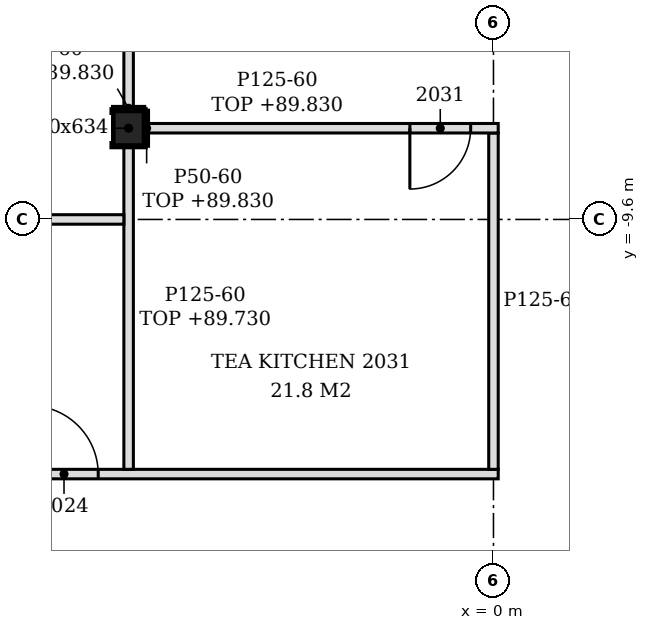
"""IFC4 building model, lengths in metres.
Left out: names, types, materials, properties, quantities, classifications, styles, units other than length and angle.
Written with IfcOpenShell. Run it as: python <this file> out.ifc"""

import sys

from ifc_helpers import new_model, si_unit, direction, frame, frame_2d, origin, origin_2d, place, context, subcontext, project, spatial, polyline, rectangle, i_section, outline, extrude, element, fill, save


model = new_model("IFC4")
c1 = context("Model", 3, precision=1e-05, world=origin(), true_north=direction((0.0, 1.0)))
c2 = subcontext(c1, "Body", "Model", "MODEL_VIEW")
j1 = project(units=[si_unit("LENGTHUNIT", "METRE"), si_unit("PLANEANGLEUNIT", "RADIAN")], contexts=[c1])
p1 = place(None, origin())
s1 = spatial("IfcSite", under=j1, at=p1, CompositionType="ELEMENT")
p2 = place(p1, origin())
s2 = spatial("IfcBuilding", under=s1, at=p2, CompositionType="ELEMENT")
p3 = place(p2, frame((0.0, 0.0, 87.0)))
s3 = spatial("IfcBuildingStorey", under=s2, at=p3, CompositionType="ELEMENT", Elevation=87.0)
p4 = place(p3, frame((-4.8, -8.4, -0.15), z_axis=(0.0, 0.0, 1.0), x_axis=(1.0, 0.0, 0.0)))
e1 = element("IfcColumn", 1, at=p4, inside=s3, PredefinedType="COLUMN", context=c2, shape_type="SweptSolid", body=[
    extrude(i_section(OverallWidth=0.424, OverallDepth=0.474, WebThickness=0.048, FlangeThickness=0.077, FilletRadius=0.015, at=origin_2d()), origin(), (0.0, 0.0, 1.0), 3.6),
])
p5 = place(p3, frame((-20.413, -12.95, 0.0), z_axis=(0.0, 0.0, 1.0), x_axis=(1.0, 0.0, 0.0)))
e2 = element("IfcWall", 2, at=p5, inside=s3, PredefinedType="PARTITIONING", context=c2, shape_type="SweptSolid", body=[
    extrude(outline(polyline([(0.0, 0.0), (20.475, 0.0), (20.475, 3.45), (15.762, 3.45), (15.76, 2.73), (15.462, 2.73), (15.46, 3.45), (6.163, 3.45), (6.16, 2.93), (5.863, 2.93), (5.861, 3.45), (0.0, 3.45), (0.0, 0.0)])), frame((0.0, 0.062, 0.0), z_axis=(0.0, -1.0, 0.0), x_axis=(1.0, 0.0, 0.0)), (0.0, 0.0, 1.0), 0.125),
])
p6 = place(p5, frame((14.312, 0.0, 0.0)))
e3 = element("IfcOpeningElement", 3, at=p6, cuts=e2, PredefinedType="OPENING", context=c2, shape_type="SweptSolid", body=[
    extrude(rectangle(XDim=0.9, YDim=2.1, at=frame_2d((0.45, 1.05))), frame((0.0, 0.073, 0.0), z_axis=(0.0, -1.0, 0.0), x_axis=(1.0, 0.0, 0.0)), (0.0, 0.0, 1.0), 0.145),
])
p7 = place(p3, frame((-4.8, -12.887, 0.0), z_axis=(0.0, 0.0, 1.0), x_axis=(0.0, 1.0, 0.0)))
e4 = element("IfcWall", 4, at=p7, inside=s3, PredefinedType="PARTITIONING", context=c2, shape_type="SweptSolid", body=[
    extrude(rectangle(XDim=4.25, YDim=0.125, at=frame_2d((2.125, 0.0))), origin(), (0.0, 0.0, 1.0), 2.73),
])
p8 = place(p3, frame((0.0, -12.887, 0.0), z_axis=(0.0, 0.0, 1.0), x_axis=(0.0, 1.0, 0.0)))
e5 = element("IfcWall", 5, at=p8, inside=s3, PredefinedType="PARTITIONING", context=c2, shape_type="SweptSolid", body=[
    extrude(outline(polyline([(0.0, 0.0), (4.425, 0.0), (4.425, 2.83), (4.337, 2.83), (4.335, 3.45), (0.0, 3.45), (0.0, 0.0)])), frame((0.0, 0.062, 0.0), z_axis=(0.0, -1.0, 0.0), x_axis=(1.0, 0.0, 0.0)), (0.0, 0.0, 1.0), 0.125),
])
p9 = place(p3, frame((-14.196, -9.6, 0.0), z_axis=(0.0, 0.0, 1.0), x_axis=(1.0, 0.0, 0.0)))
e6 = element("IfcWall", 6, at=p9, inside=s3, PredefinedType="PARTITIONING", context=c2, shape_type="SweptSolid", body=[
    extrude(outline(polyline([(0.0, 0.0), (9.333, 0.0), (9.333, 2.73), (9.246, 2.73), (9.243, 3.45), (0.0, 3.45), (0.0, 0.0)])), frame((0.0, 0.062, 0.0), z_axis=(0.0, -1.0, 0.0), x_axis=(1.0, 0.0, 0.0)), (0.0, 0.0, 1.0), 0.125),
])
p10 = place(p3, frame((-4.588, -8.4, 0.0), z_axis=(0.0, 0.0, 1.0), x_axis=(1.0, 0.0, 0.0)))
e7 = element("IfcWall", 7, at=p10, inside=s3, PredefinedType="PARTITIONING", context=c2, shape_type="SweptSolid", body=[
    extrude(rectangle(XDim=4.65, YDim=0.125, at=frame_2d((2.325, 0.0))), origin(), (0.0, 0.0, 1.0), 2.83),
])
p11 = place(p10, frame((3.488, 0.0, 0.0)))
e8 = element("IfcOpeningElement", 8, at=p11, cuts=e7, PredefinedType="OPENING", context=c2, shape_type="SweptSolid", body=[
    extrude(rectangle(XDim=0.8, YDim=2.1, at=frame_2d((0.4, 1.05))), frame((0.0, 0.073, 0.0), z_axis=(0.0, -1.0, 0.0), x_axis=(1.0, 0.0, 0.0)), (0.0, 0.0, 1.0), 0.145),
])
p12 = place(p3, frame((-4.8, -8.163, 0.0), z_axis=(0.0, 0.0, 1.0), x_axis=(0.0, 1.0, 0.0)))
e9 = element("IfcWall", 9, at=p12, inside=s3, PredefinedType="PARTITIONING", context=c2, shape_type="SweptSolid", body=[
    extrude(rectangle(XDim=8.101, YDim=0.125, at=frame_2d((4.05, 0.0))), origin(), (0.0, 0.0, 1.0), 2.83),
])
p13 = place(p12, frame((2.163, 0.0, 0.0)))
e10 = element("IfcOpeningElement", 10, at=p13, cuts=e9, PredefinedType="OPENING", context=c2, shape_type="SweptSolid", body=[
    extrude(rectangle(XDim=0.9, YDim=2.1, at=frame_2d((0.45, 1.05))), frame((0.0, 0.073, 0.0), z_axis=(0.0, -1.0, 0.0), x_axis=(1.0, 0.0, 0.0)), (0.0, 0.0, 1.0), 0.145),
])
p14 = place(p3, frame((-4.563, -8.637, 0.0), z_axis=(0.0, 0.0, 1.0), x_axis=(0.0, 1.0, 0.0)))
e11 = element("IfcWall", 11, at=p14, inside=s3, PredefinedType="PARTITIONING", context=c2, shape_type="SweptSolid", body=[
    extrude(rectangle(XDim=0.474, YDim=0.05, at=frame_2d((0.237, 0.0))), origin(), (0.0, 0.0, 1.0), 2.83),
])
p15 = place(p3, frame((-5.012, -8.138, 0.0), z_axis=(0.0, 0.0, 1.0), x_axis=(1.0, 0.0, 0.0)))
e12 = element("IfcWall", 12, at=p15, inside=s3, PredefinedType="PARTITIONING", context=c2, shape_type="SweptSolid", body=[
    extrude(rectangle(XDim=0.424, YDim=0.05, at=frame_2d((0.212, 0.0))), origin(), (0.0, 0.0, 1.0), 2.83),
])
p16 = place(p6, origin())
e13 = element("IfcDoor", 13, at=p16, inside=s3, OperationType="SINGLE_SWING_LEFT", PredefinedType="DOOR", context=c2, shape_type="SweptSolid", body=[
    extrude(rectangle(XDim=0.9, YDim=2.1, at=frame_2d((0.45, 1.05))), frame((0.0, 0.025, 0.0), z_axis=(0.0, -1.0, 0.0), x_axis=(1.0, 0.0, 0.0)), (0.0, 0.0, 1.0), 0.05),
])
fill(e3, e13)
p17 = place(p11, frame((0.8, 0.0, 0.0), z_axis=(0.0, 0.0, 1.0), x_axis=(-1.0, 0.0, 0.0)))
e14 = element("IfcDoor", 14, at=p17, inside=s3, OperationType="SINGLE_SWING_RIGHT", PredefinedType="DOOR", context=c2, shape_type="SweptSolid", body=[
    extrude(rectangle(XDim=0.8, YDim=2.1, at=frame_2d((0.4, 1.05))), frame((0.0, 0.025, 0.0), z_axis=(0.0, -1.0, 0.0), x_axis=(1.0, 0.0, 0.0)), (0.0, 0.0, 1.0), 0.05),
])
fill(e8, e14)
save(model, sys.argv[1])
